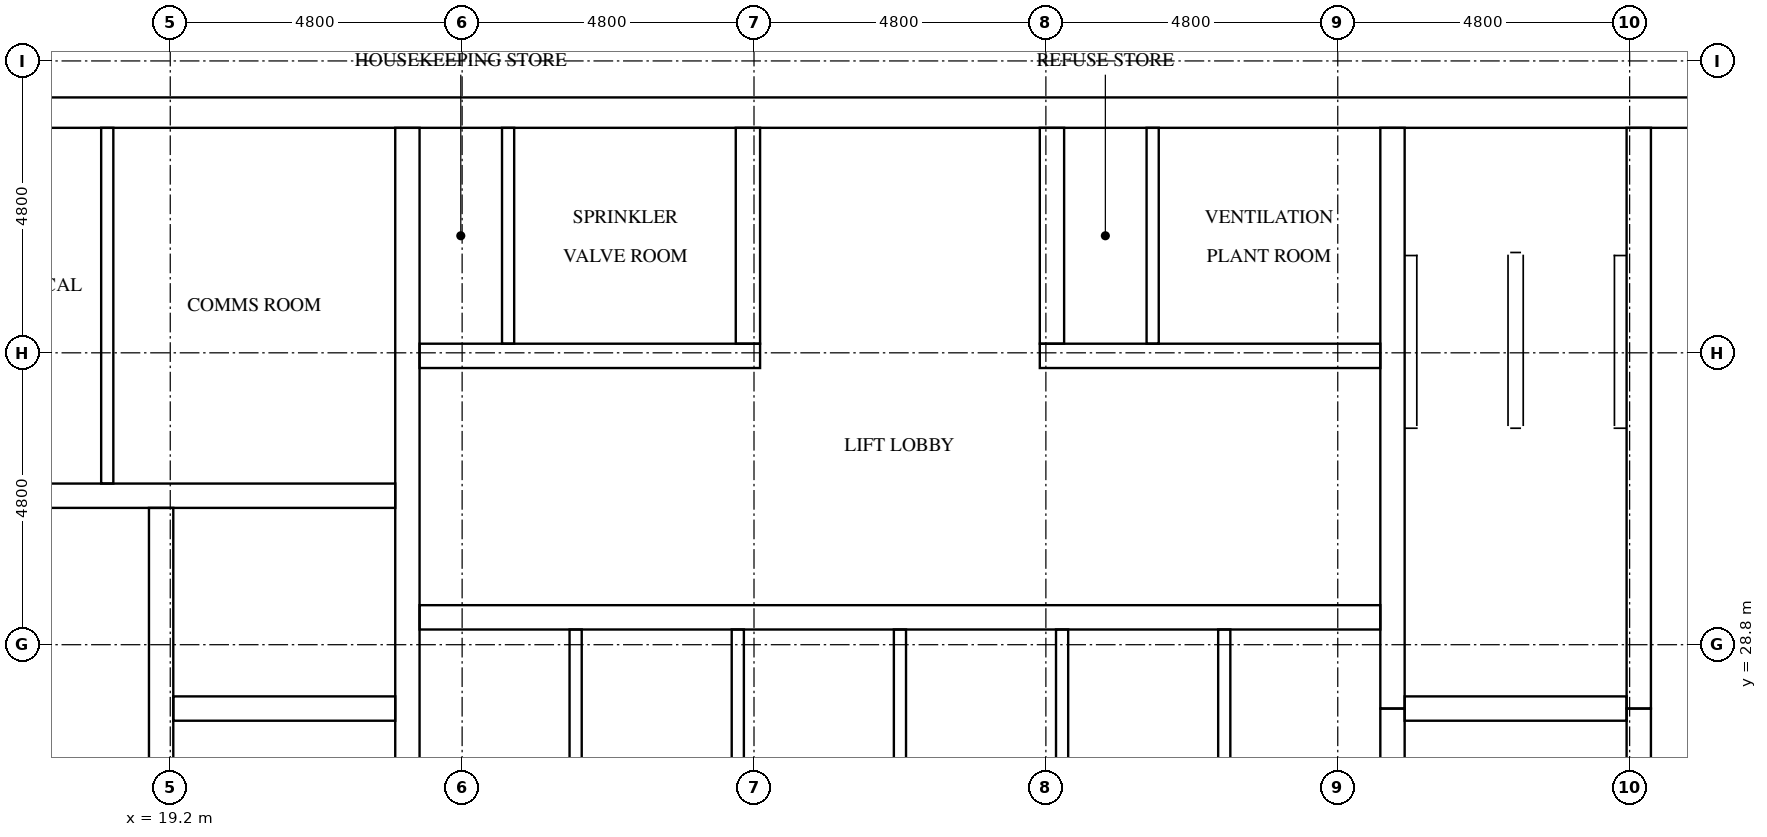
"""IFC4 building model, lengths in metres.
Left out: names, types, materials, properties, quantities, classifications, styles, units other than length and angle.
Written with IfcOpenShell. Run it as: python <this file> out.ifc"""

import sys

from ifc_helpers import new_model, si_unit, direction, frame, frame_2d, origin, place, context, subcontext, project, spatial, rectangle, extrude, element, fill, save


model = new_model("IFC4")
c1 = context("Model", 3, precision=1e-05, world=origin(), true_north=direction((0.0, 1.0)))
c2 = subcontext(c1, "Body", "Model", "MODEL_VIEW")
j1 = project(units=[si_unit("LENGTHUNIT", "METRE"), si_unit("PLANEANGLEUNIT", "RADIAN")], contexts=[c1])
p1 = place(None, origin())
s1 = spatial("IfcSite", under=j1, at=p1, CompositionType="ELEMENT")
p2 = place(p1, origin())
s2 = spatial("IfcBuilding", under=s1, at=p2, CompositionType="ELEMENT")
p3 = place(p2, frame((0.0, 0.0, 279.1)))
s3 = spatial("IfcBuildingStorey", under=s2, at=p3, CompositionType="ELEMENT", Elevation=279.1)
p4 = place(p3, frame((15.0, 37.55, 0.0), z_axis=(0.0, 0.0, 1.0), x_axis=(1.0, 0.0, 0.0)))
e1 = element("IfcWall", 1, at=p4, inside=s3, PredefinedType="SHEAR", context=c2, shape_type="SweptSolid", body=[
    extrude(rectangle(XDim=32.4, YDim=0.5, at=frame_2d((16.2, 0.0))), origin(), (0.0, 0.0, 1.0), 3.2),
])
p5 = place(p4, frame((15.3, 0.0, 0.0)))
e2 = element("IfcOpeningElement", 2, at=p5, cuts=e1, PredefinedType="OPENING", context=c2, shape_type="SweptSolid", body=[
    extrude(rectangle(XDim=1.8, YDim=2.1, at=frame_2d((0.9, 1.05))), frame((0.0, 0.26, 0.0), z_axis=(0.0, -1.0, 0.0), x_axis=(1.0, 0.0, 0.0)), (0.0, 0.0, 1.0), 0.52),
])
p6 = place(p4, frame((1.282, 0.0, 0.0)))
e3 = element("IfcOpeningElement", 3, at=p6, cuts=e1, PredefinedType="OPENING", context=c2, shape_type="SweptSolid", body=[
    extrude(rectangle(XDim=1.0, YDim=2.1, at=frame_2d((0.5, 1.05))), frame((0.0, 0.26, 0.0), z_axis=(0.0, -1.0, 0.0), x_axis=(1.0, 0.0, 0.0)), (0.0, 0.0, 1.0), 0.52),
])
p7 = place(p4, frame((5.082, 0.0, 0.0)))
e4 = element("IfcOpeningElement", 4, at=p7, cuts=e1, PredefinedType="OPENING", context=c2, shape_type="SweptSolid", body=[
    extrude(rectangle(XDim=1.0, YDim=2.1, at=frame_2d((0.5, 1.05))), frame((0.0, 0.26, 0.0), z_axis=(0.0, -1.0, 0.0), x_axis=(1.0, 0.0, 0.0)), (0.0, 0.0, 1.0), 0.52),
])
p8 = place(p3, frame((19.05, 15.5, 0.0), z_axis=(0.0, 0.0, 1.0), x_axis=(0.0, 1.0, 0.0)))
e5 = element("IfcWall", 5, at=p8, inside=s3, PredefinedType="SHEAR", context=c2, shape_type="SweptSolid", body=[
    extrude(rectangle(XDim=15.55, YDim=0.4, at=frame_2d((7.775, 0.0))), origin(), (0.0, 0.0, 1.0), 3.2),
])
p9 = place(p8, frame((9.95, 0.0, 0.0)))
e6 = element("IfcOpeningElement", 6, at=p9, cuts=e5, PredefinedType="OPENING", context=c2, shape_type="SweptSolid", body=[
    extrude(rectangle(XDim=1.1, YDim=2.1, at=frame_2d((0.55, 1.05))), frame((0.0, 0.21, 0.0), z_axis=(0.0, -1.0, 0.0), x_axis=(1.0, 0.0, 0.0)), (0.0, 0.0, 1.0), 0.42),
])
p10 = place(p8, frame((13.45, 0.0, 0.0)))
e7 = element("IfcOpeningElement", 7, at=p10, cuts=e5, PredefinedType="OPENING", context=c2, shape_type="SweptSolid", body=[
    extrude(rectangle(XDim=1.1, YDim=2.1, at=frame_2d((0.55, 1.05))), frame((0.0, 0.21, 0.0), z_axis=(0.0, -1.0, 0.0), x_axis=(1.0, 0.0, 0.0)), (0.0, 0.0, 1.0), 0.42),
])
p11 = place(p8, frame((0.7, 0.0, 0.0)))
e8 = element("IfcOpeningElement", 8, at=p11, cuts=e5, PredefinedType="OPENING", context=c2, shape_type="SweptSolid", body=[
    extrude(rectangle(XDim=1.2, YDim=2.1, at=frame_2d((0.6, 1.05))), frame((0.0, 0.21, 0.0), z_axis=(0.0, -1.0, 0.0), x_axis=(1.0, 0.0, 0.0)), (0.0, 0.0, 1.0), 0.42),
])
p12 = place(p3, frame((23.1, 15.5, 0.0), z_axis=(0.0, 0.0, 1.0), x_axis=(0.0, 1.0, 0.0)))
e9 = element("IfcWall", 9, at=p12, inside=s3, PredefinedType="SHEAR", context=c2, shape_type="SweptSolid", body=[
    extrude(rectangle(XDim=21.8, YDim=0.4, at=frame_2d((10.9, 0.0))), origin(), (0.0, 0.0, 1.0), 3.2),
])
p13 = place(p3, frame((39.3, 24.25, 0.0), z_axis=(0.0, 0.0, 1.0), x_axis=(0.0, 1.0, 0.0)))
e10 = element("IfcWall", 10, at=p13, inside=s3, PredefinedType="SHEAR", context=c2, shape_type="SweptSolid", body=[
    extrude(rectangle(XDim=3.5, YDim=0.4, at=frame_2d((1.75, 0.0))), origin(), (0.0, 0.0, 1.0), 3.2),
])
p14 = place(p3, frame((39.3, 27.75, 0.0), z_axis=(0.0, 0.0, 1.0), x_axis=(0.0, 1.0, 0.0)))
e11 = element("IfcWall", 11, at=p14, inside=s3, PredefinedType="SHEAR", context=c2, shape_type="SweptSolid", body=[
    extrude(rectangle(XDim=9.55, YDim=0.4, at=frame_2d((4.775, 0.0))), origin(), (0.0, 0.0, 1.0), 3.2),
])
p15 = place(p3, frame((43.35, 24.25, 0.0), z_axis=(0.0, 0.0, 1.0), x_axis=(0.0, 1.0, 0.0)))
e12 = element("IfcWall", 12, at=p15, inside=s3, PredefinedType="SHEAR", context=c2, shape_type="SweptSolid", body=[
    extrude(rectangle(XDim=3.5, YDim=0.4, at=frame_2d((1.75, 0.0))), origin(), (0.0, 0.0, 1.0), 3.2),
])
p16 = place(p15, frame((1.2, 0.0, 0.0)))
e13 = element("IfcOpeningElement", 13, at=p16, cuts=e12, PredefinedType="OPENING", context=c2, shape_type="SweptSolid", body=[
    extrude(rectangle(XDim=1.1, YDim=2.1, at=frame_2d((0.55, 1.05))), frame((0.0, 0.21, 0.0), z_axis=(0.0, -1.0, 0.0), x_axis=(1.0, 0.0, 0.0)), (0.0, 0.0, 1.0), 0.42),
])
p17 = place(p3, frame((43.35, 27.75, 0.0), z_axis=(0.0, 0.0, 1.0), x_axis=(0.0, 1.0, 0.0)))
e14 = element("IfcWall", 14, at=p17, inside=s3, PredefinedType="SHEAR", context=c2, shape_type="SweptSolid", body=[
    extrude(rectangle(XDim=9.55, YDim=0.4, at=frame_2d((4.775, 0.0))), origin(), (0.0, 0.0, 1.0), 3.2),
])
p18 = place(p17, frame((7.65, 0.0, 0.0)))
e15 = element("IfcOpeningElement", 15, at=p18, cuts=e14, PredefinedType="OPENING", context=c2, shape_type="SweptSolid", body=[
    extrude(rectangle(XDim=1.2, YDim=2.1, at=frame_2d((0.6, 1.05))), frame((0.0, 0.21, 0.0), z_axis=(0.0, -1.0, 0.0), x_axis=(1.0, 0.0, 0.0)), (0.0, 0.0, 1.0), 0.42),
])
p19 = place(p3, frame((19.25, 27.75, 0.0), z_axis=(0.0, 0.0, 1.0), x_axis=(1.0, 0.0, 0.0)))
e16 = element("IfcWall", 16, at=p19, inside=s3, PredefinedType="SHEAR", context=c2, shape_type="SweptSolid", body=[
    extrude(rectangle(XDim=3.65, YDim=0.4, at=frame_2d((1.825, 0.0))), origin(), (0.0, 0.0, 1.0), 3.2),
])
p20 = place(p3, frame((15.5, 31.25, 0.0), z_axis=(0.0, 0.0, 1.0), x_axis=(1.0, 0.0, 0.0)))
e17 = element("IfcWall", 17, at=p20, inside=s3, PredefinedType="SHEAR", context=c2, shape_type="SweptSolid", body=[
    extrude(rectangle(XDim=7.4, YDim=0.4, at=frame_2d((3.7, 0.0))), origin(), (0.0, 0.0, 1.0), 3.2),
])
p21 = place(p3, frame((39.5, 27.75, 0.0), z_axis=(0.0, 0.0, 1.0), x_axis=(1.0, 0.0, 0.0)))
e18 = element("IfcWall", 18, at=p21, inside=s3, PredefinedType="SHEAR", context=c2, shape_type="SweptSolid", body=[
    extrude(rectangle(XDim=3.65, YDim=0.4, at=frame_2d((1.825, 0.0))), origin(), (0.0, 0.0, 1.0), 3.2),
])
p22 = place(p3, frame((23.3, 29.25, 0.0), z_axis=(0.0, 0.0, 1.0), x_axis=(1.0, 0.0, 0.0)))
e19 = element("IfcWall", 19, at=p22, inside=s3, PredefinedType="SHEAR", context=c2, shape_type="SweptSolid", body=[
    extrude(rectangle(XDim=15.8, YDim=0.4, at=frame_2d((7.9, 0.0))), origin(), (0.0, 0.0, 1.0), 3.2),
])
p23 = place(p22, frame((0.683, 0.0, 0.0)))
e20 = element("IfcOpeningElement", 20, at=p23, cuts=e19, PredefinedType="OPENING", context=c2, shape_type="SweptSolid", body=[
    extrude(rectangle(XDim=1.1, YDim=2.1, at=frame_2d((0.55, 1.05))), frame((0.0, 0.21, 0.0), z_axis=(0.0, -1.0, 0.0), x_axis=(1.0, 0.0, 0.0)), (0.0, 0.0, 1.0), 0.42),
])
p24 = place(p22, frame((3.35, 0.0, 0.0)))
e21 = element("IfcOpeningElement", 21, at=p24, cuts=e19, PredefinedType="OPENING", context=c2, shape_type="SweptSolid", body=[
    extrude(rectangle(XDim=1.1, YDim=2.1, at=frame_2d((0.55, 1.05))), frame((0.0, 0.21, 0.0), z_axis=(0.0, -1.0, 0.0), x_axis=(1.0, 0.0, 0.0)), (0.0, 0.0, 1.0), 0.42),
])
p25 = place(p22, frame((6.017, 0.0, 0.0)))
e22 = element("IfcOpeningElement", 22, at=p25, cuts=e19, PredefinedType="OPENING", context=c2, shape_type="SweptSolid", body=[
    extrude(rectangle(XDim=1.1, YDim=2.1, at=frame_2d((0.55, 1.05))), frame((0.0, 0.21, 0.0), z_axis=(0.0, -1.0, 0.0), x_axis=(1.0, 0.0, 0.0)), (0.0, 0.0, 1.0), 0.42),
])
p26 = place(p22, frame((8.683, 0.0, 0.0)))
e23 = element("IfcOpeningElement", 23, at=p26, cuts=e19, PredefinedType="OPENING", context=c2, shape_type="SweptSolid", body=[
    extrude(rectangle(XDim=1.1, YDim=2.1, at=frame_2d((0.55, 1.05))), frame((0.0, 0.21, 0.0), z_axis=(0.0, -1.0, 0.0), x_axis=(1.0, 0.0, 0.0)), (0.0, 0.0, 1.0), 0.42),
])
p27 = place(p22, frame((11.35, 0.0, 0.0)))
e24 = element("IfcOpeningElement", 24, at=p27, cuts=e19, PredefinedType="OPENING", context=c2, shape_type="SweptSolid", body=[
    extrude(rectangle(XDim=1.1, YDim=2.1, at=frame_2d((0.55, 1.05))), frame((0.0, 0.21, 0.0), z_axis=(0.0, -1.0, 0.0), x_axis=(1.0, 0.0, 0.0)), (0.0, 0.0, 1.0), 0.42),
])
p28 = place(p22, frame((14.017, 0.0, 0.0)))
e25 = element("IfcOpeningElement", 25, at=p28, cuts=e19, PredefinedType="OPENING", context=c2, shape_type="SweptSolid", body=[
    extrude(rectangle(XDim=1.1, YDim=2.1, at=frame_2d((0.55, 1.05))), frame((0.0, 0.21, 0.0), z_axis=(0.0, -1.0, 0.0), x_axis=(1.0, 0.0, 0.0)), (0.0, 0.0, 1.0), 0.42),
])
p29 = place(p3, frame((23.3, 33.55, 0.0), z_axis=(0.0, 0.0, 1.0), x_axis=(1.0, 0.0, 0.0)))
e26 = element("IfcWall", 26, at=p29, inside=s3, PredefinedType="SHEAR", context=c2, shape_type="SweptSolid", body=[
    extrude(rectangle(XDim=5.6, YDim=0.4, at=frame_2d((2.8, 0.0))), origin(), (0.0, 0.0, 1.0), 3.2),
])
p30 = place(p29, frame((0.178, 0.0, 0.0)))
e27 = element("IfcOpeningElement", 27, at=p30, cuts=e26, PredefinedType="OPENING", context=c2, shape_type="SweptSolid", body=[
    extrude(rectangle(XDim=1.0, YDim=2.1, at=frame_2d((0.5, 1.05))), frame((0.0, 0.21, 0.0), z_axis=(0.0, -1.0, 0.0), x_axis=(1.0, 0.0, 0.0)), (0.0, 0.0, 1.0), 0.42),
])
p31 = place(p29, frame((2.878, 0.0, 0.0)))
e28 = element("IfcOpeningElement", 28, at=p31, cuts=e26, PredefinedType="OPENING", context=c2, shape_type="SweptSolid", body=[
    extrude(rectangle(XDim=1.0, YDim=2.1, at=frame_2d((0.5, 1.05))), frame((0.0, 0.21, 0.0), z_axis=(0.0, -1.0, 0.0), x_axis=(1.0, 0.0, 0.0)), (0.0, 0.0, 1.0), 0.42),
])
p32 = place(p3, frame((33.5, 33.55, 0.0), z_axis=(0.0, 0.0, 1.0), x_axis=(1.0, 0.0, 0.0)))
e29 = element("IfcWall", 29, at=p32, inside=s3, PredefinedType="SHEAR", context=c2, shape_type="SweptSolid", body=[
    extrude(rectangle(XDim=5.6, YDim=0.4, at=frame_2d((2.8, 0.0))), origin(), (0.0, 0.0, 1.0), 3.2),
])
p33 = place(p32, frame((0.578, 0.0, 0.0)))
e30 = element("IfcOpeningElement", 30, at=p33, cuts=e29, PredefinedType="OPENING", context=c2, shape_type="SweptSolid", body=[
    extrude(rectangle(XDim=1.0, YDim=2.1, at=frame_2d((0.5, 1.05))), frame((0.0, 0.21, 0.0), z_axis=(0.0, -1.0, 0.0), x_axis=(1.0, 0.0, 0.0)), (0.0, 0.0, 1.0), 0.42),
])
p34 = place(p32, frame((3.278, 0.0, 0.0)))
e31 = element("IfcOpeningElement", 31, at=p34, cuts=e29, PredefinedType="OPENING", context=c2, shape_type="SweptSolid", body=[
    extrude(rectangle(XDim=1.0, YDim=2.1, at=frame_2d((0.5, 1.05))), frame((0.0, 0.21, 0.0), z_axis=(0.0, -1.0, 0.0), x_axis=(1.0, 0.0, 0.0)), (0.0, 0.0, 1.0), 0.42),
])
for number, where, z_axis, x_axis in (
    (32, (28.7, 33.75, 0.0), (0.0, 0.0, 1.0), (0.0, 1.0, 0.0)),
    (33, (33.7, 33.75, 0.0), (0.0, 0.0, 1.0), (0.0, 1.0, 0.0)),
):
    element("IfcWall", number, at=place(p3, frame(where, z_axis=z_axis, x_axis=x_axis)), inside=s3, PredefinedType="SHEAR", context=c2, shape_type="SweptSolid", body=[
        extrude(rectangle(XDim=3.55, YDim=0.4, at=frame_2d((1.775, 0.0))), origin(), (0.0, 0.0, 1.0), 3.2),
    ])
for number, where, z_axis, x_axis in (
    (34, (25.867, 26.35, 0.0), (0.0, 0.0, 1.0), (0.0, 1.0, 0.0)),
    (35, (28.533, 26.35, 0.0), (0.0, 0.0, 1.0), (0.0, 1.0, 0.0)),
    (36, (31.2, 26.35, 0.0), (0.0, 0.0, 1.0), (0.0, 1.0, 0.0)),
    (37, (33.867, 26.35, 0.0), (0.0, 0.0, 1.0), (0.0, 1.0, 0.0)),
    (38, (36.533, 26.35, 0.0), (0.0, 0.0, 1.0), (0.0, 1.0, 0.0)),
):
    element("IfcWall", number, at=place(p3, frame(where, z_axis=z_axis, x_axis=x_axis)), inside=s3, PredefinedType="SOLIDWALL", context=c2, shape_type="SweptSolid", body=[
        extrude(rectangle(XDim=2.7, YDim=0.2, at=frame_2d((1.35, 0.0))), origin(), (0.0, 0.0, 1.0), 3.2),
    ])
p35 = place(p3, frame((18.164, 31.45, 0.0), z_axis=(0.0, 0.0, 1.0), x_axis=(0.0, 1.0, 0.0)))
e39 = element("IfcWall", 39, at=p35, inside=s3, PredefinedType="PARTITIONING", context=c2, shape_type="SweptSolid", body=[
    extrude(rectangle(XDim=5.85, YDim=0.2, at=frame_2d((2.925, 0.0))), origin(), (0.0, 0.0, 1.0), 3.2),
])
for number, where, z_axis, x_axis in (
    (40, (24.756, 33.75, 0.0), (0.0, 0.0, 1.0), (0.0, 1.0, 0.0)),
    (41, (35.356, 33.75, 0.0), (0.0, 0.0, 1.0), (0.0, 1.0, 0.0)),
):
    element("IfcWall", number, at=place(p3, frame(where, z_axis=z_axis, x_axis=x_axis)), inside=s3, PredefinedType="PARTITIONING", context=c2, shape_type="SweptSolid", body=[
        extrude(rectangle(XDim=3.55, YDim=0.2, at=frame_2d((1.775, 0.0))), origin(), (0.0, 0.0, 1.0), 3.2),
    ])
p36 = place(p23, origin())
e42 = element("IfcDoor", 42, at=p36, inside=s3, OperationType="DOUBLE_DOOR_SLIDING", PredefinedType="DOOR", context=c2, shape_type="SweptSolid", body=[
    extrude(rectangle(XDim=1.1, YDim=2.1, at=frame_2d((0.55, 1.05))), frame((0.0, 0.025, 0.0), z_axis=(0.0, -1.0, 0.0), x_axis=(1.0, 0.0, 0.0)), (0.0, 0.0, 1.0), 0.05),
])
fill(e20, e42)
p37 = place(p24, origin())
e43 = element("IfcDoor", 43, at=p37, inside=s3, OperationType="DOUBLE_DOOR_SLIDING", PredefinedType="DOOR", context=c2, shape_type="SweptSolid", body=[
    extrude(rectangle(XDim=1.1, YDim=2.1, at=frame_2d((0.55, 1.05))), frame((0.0, 0.025, 0.0), z_axis=(0.0, -1.0, 0.0), x_axis=(1.0, 0.0, 0.0)), (0.0, 0.0, 1.0), 0.05),
])
fill(e21, e43)
p38 = place(p25, origin())
e44 = element("IfcDoor", 44, at=p38, inside=s3, OperationType="DOUBLE_DOOR_SLIDING", PredefinedType="DOOR", context=c2, shape_type="SweptSolid", body=[
    extrude(rectangle(XDim=1.1, YDim=2.1, at=frame_2d((0.55, 1.05))), frame((0.0, 0.025, 0.0), z_axis=(0.0, -1.0, 0.0), x_axis=(1.0, 0.0, 0.0)), (0.0, 0.0, 1.0), 0.05),
])
fill(e22, e44)
p39 = place(p26, origin())
e45 = element("IfcDoor", 45, at=p39, inside=s3, OperationType="DOUBLE_DOOR_SLIDING", PredefinedType="DOOR", context=c2, shape_type="SweptSolid", body=[
    extrude(rectangle(XDim=1.1, YDim=2.1, at=frame_2d((0.55, 1.05))), frame((0.0, 0.025, 0.0), z_axis=(0.0, -1.0, 0.0), x_axis=(1.0, 0.0, 0.0)), (0.0, 0.0, 1.0), 0.05),
])
fill(e23, e45)
p40 = place(p27, origin())
e46 = element("IfcDoor", 46, at=p40, inside=s3, OperationType="DOUBLE_DOOR_SLIDING", PredefinedType="DOOR", context=c2, shape_type="SweptSolid", body=[
    extrude(rectangle(XDim=1.1, YDim=2.1, at=frame_2d((0.55, 1.05))), frame((0.0, 0.025, 0.0), z_axis=(0.0, -1.0, 0.0), x_axis=(1.0, 0.0, 0.0)), (0.0, 0.0, 1.0), 0.05),
])
fill(e24, e46)
p41 = place(p28, origin())
e47 = element("IfcDoor", 47, at=p41, inside=s3, OperationType="DOUBLE_DOOR_SLIDING", PredefinedType="DOOR", context=c2, shape_type="SweptSolid", body=[
    extrude(rectangle(XDim=1.1, YDim=2.1, at=frame_2d((0.55, 1.05))), frame((0.0, 0.025, 0.0), z_axis=(0.0, -1.0, 0.0), x_axis=(1.0, 0.0, 0.0)), (0.0, 0.0, 1.0), 0.05),
])
fill(e25, e47)
p42 = place(p10, origin())
e48 = element("IfcDoor", 48, at=p42, inside=s3, OperationType="DOUBLE_DOOR_SLIDING", PredefinedType="DOOR", context=c2, shape_type="SweptSolid", body=[
    extrude(rectangle(XDim=1.1, YDim=2.1, at=frame_2d((0.55, 1.05))), frame((0.0, 0.025, 0.0), z_axis=(0.0, -1.0, 0.0), x_axis=(1.0, 0.0, 0.0)), (0.0, 0.0, 1.0), 0.05),
])
fill(e7, e48)
p43 = place(p18, origin())
e49 = element("IfcDoor", 49, at=p43, inside=s3, OperationType="SINGLE_SWING_LEFT", PredefinedType="DOOR", context=c2, shape_type="SweptSolid", body=[
    extrude(rectangle(XDim=1.2, YDim=2.1, at=frame_2d((0.6, 1.05))), frame((0.0, 0.025, 0.0), z_axis=(0.0, -1.0, 0.0), x_axis=(1.0, 0.0, 0.0)), (0.0, 0.0, 1.0), 0.05),
])
fill(e15, e49)
p44 = place(p5, origin())
e50 = element("IfcDoor", 50, at=p44, inside=s3, OperationType="DOUBLE_DOOR_SINGLE_SWING", PredefinedType="DOOR", context=c2, shape_type="SweptSolid", body=[
    extrude(rectangle(XDim=1.8, YDim=2.1, at=frame_2d((0.9, 1.05))), frame((0.0, 0.025, 0.0), z_axis=(0.0, -1.0, 0.0), x_axis=(1.0, 0.0, 0.0)), (0.0, 0.0, 1.0), 0.05),
])
fill(e2, e50)
p45 = place(p6, origin())
e51 = element("IfcDoor", 51, at=p45, inside=s3, OperationType="SINGLE_SWING_RIGHT", PredefinedType="DOOR", context=c2, shape_type="SweptSolid", body=[
    extrude(rectangle(XDim=1.0, YDim=2.1, at=frame_2d((0.5, 1.05))), frame((0.0, 0.025, 0.0), z_axis=(0.0, -1.0, 0.0), x_axis=(1.0, 0.0, 0.0)), (0.0, 0.0, 1.0), 0.05),
])
fill(e3, e51)
p46 = place(p7, origin())
e52 = element("IfcDoor", 52, at=p46, inside=s3, OperationType="SINGLE_SWING_LEFT", PredefinedType="DOOR", context=c2, shape_type="SweptSolid", body=[
    extrude(rectangle(XDim=1.0, YDim=2.1, at=frame_2d((0.5, 1.05))), frame((0.0, 0.025, 0.0), z_axis=(0.0, -1.0, 0.0), x_axis=(1.0, 0.0, 0.0)), (0.0, 0.0, 1.0), 0.05),
])
fill(e4, e52)
p47 = place(p30, frame((1.0, 0.0, 0.0), z_axis=(0.0, 0.0, 1.0), x_axis=(-1.0, 0.0, 0.0)))
e53 = element("IfcDoor", 53, at=p47, inside=s3, OperationType="SINGLE_SWING_RIGHT", PredefinedType="DOOR", context=c2, shape_type="SweptSolid", body=[
    extrude(rectangle(XDim=1.0, YDim=2.1, at=frame_2d((0.5, 1.05))), frame((0.0, 0.025, 0.0), z_axis=(0.0, -1.0, 0.0), x_axis=(1.0, 0.0, 0.0)), (0.0, 0.0, 1.0), 0.05),
])
fill(e27, e53)
p48 = place(p31, frame((1.0, 0.0, 0.0), z_axis=(0.0, 0.0, 1.0), x_axis=(-1.0, 0.0, 0.0)))
e54 = element("IfcDoor", 54, at=p48, inside=s3, OperationType="SINGLE_SWING_LEFT", PredefinedType="DOOR", context=c2, shape_type="SweptSolid", body=[
    extrude(rectangle(XDim=1.0, YDim=2.1, at=frame_2d((0.5, 1.05))), frame((0.0, 0.025, 0.0), z_axis=(0.0, -1.0, 0.0), x_axis=(1.0, 0.0, 0.0)), (0.0, 0.0, 1.0), 0.05),
])
fill(e28, e54)
p49 = place(p33, frame((1.0, 0.0, 0.0), z_axis=(0.0, 0.0, 1.0), x_axis=(-1.0, 0.0, 0.0)))
e55 = element("IfcDoor", 55, at=p49, inside=s3, OperationType="SINGLE_SWING_RIGHT", PredefinedType="DOOR", context=c2, shape_type="SweptSolid", body=[
    extrude(rectangle(XDim=1.0, YDim=2.1, at=frame_2d((0.5, 1.05))), frame((0.0, 0.025, 0.0), z_axis=(0.0, -1.0, 0.0), x_axis=(1.0, 0.0, 0.0)), (0.0, 0.0, 1.0), 0.05),
])
fill(e30, e55)
p50 = place(p34, frame((1.0, 0.0, 0.0), z_axis=(0.0, 0.0, 1.0), x_axis=(-1.0, 0.0, 0.0)))
e56 = element("IfcDoor", 56, at=p50, inside=s3, OperationType="SINGLE_SWING_LEFT", PredefinedType="DOOR", context=c2, shape_type="SweptSolid", body=[
    extrude(rectangle(XDim=1.0, YDim=2.1, at=frame_2d((0.5, 1.05))), frame((0.0, 0.025, 0.0), z_axis=(0.0, -1.0, 0.0), x_axis=(1.0, 0.0, 0.0)), (0.0, 0.0, 1.0), 0.05),
])
fill(e31, e56)
save(model, sys.argv[1])
